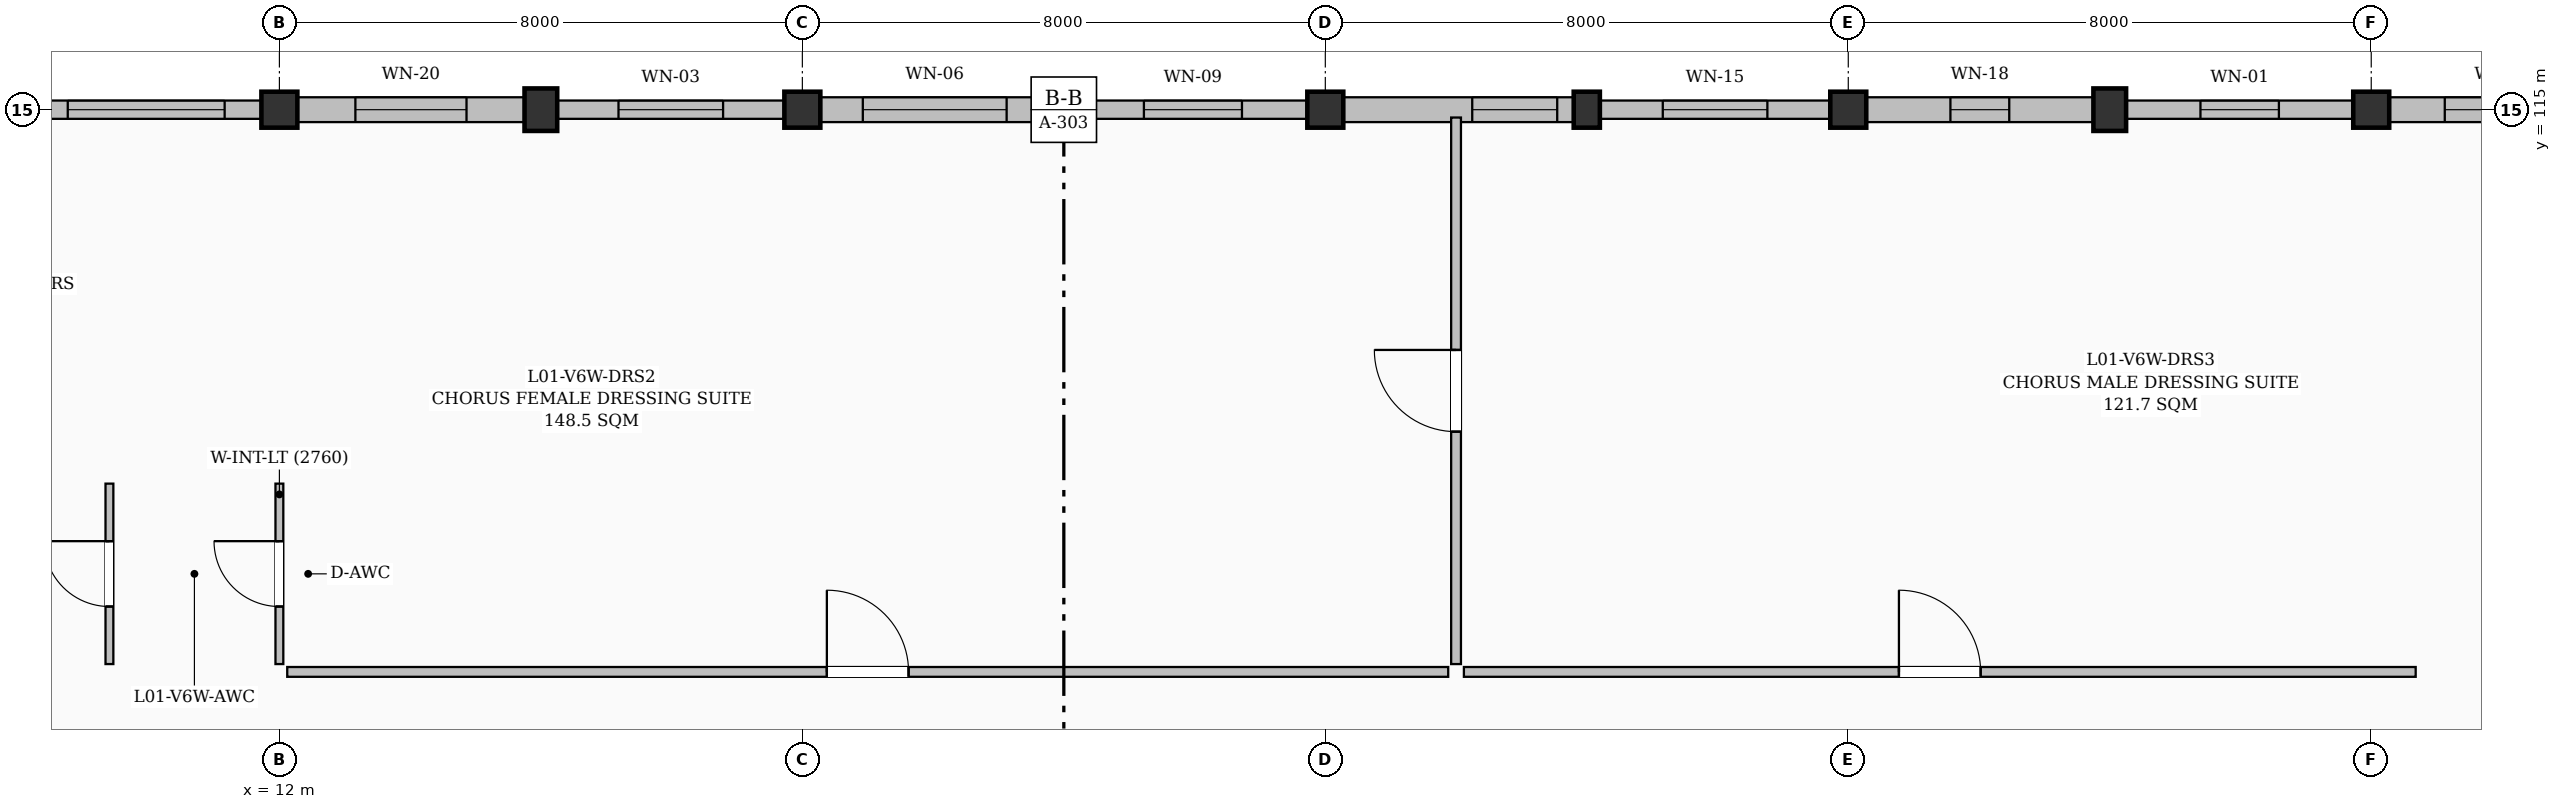
"""IFC4 building model, lengths in metres.
Left out: names, types, materials, properties, quantities, classifications, styles, units other than length and angle.
Written with IfcOpenShell. Run it as: python <this file> out.ifc"""

import sys

from ifc_helpers import new_model, si_unit, direction, frame, frame_2d, origin, origin_2d, place, context, subcontext, project, spatial, rectangle, extrude, element, fill, save


model = new_model("IFC4")
c1 = context("Model", 3, precision=1e-05, world=origin(), true_north=direction((0.0, 1.0)))
c2 = subcontext(c1, "Body", "Model", "MODEL_VIEW")
j1 = project(units=[si_unit("LENGTHUNIT", "METRE"), si_unit("PLANEANGLEUNIT", "RADIAN")], contexts=[c1])
p1 = place(None, origin())
s1 = spatial("IfcSite", under=j1, at=p1, CompositionType="ELEMENT")
p2 = place(p1, origin())
s2 = spatial("IfcBuilding", under=s1, at=p2, CompositionType="ELEMENT")
p3 = place(p2, frame((0.0, 0.0, 4.8)))
s3 = spatial("IfcBuildingStorey", under=s2, at=p3, CompositionType="ELEMENT", Elevation=4.8)
p4 = place(p3, frame((12.0, 115.0, 0.0), z_axis=(0.0, 0.0, 1.0), x_axis=(1.0, 0.0, 0.0)))
e1 = element("IfcColumn", 1, at=p4, inside=s3, PredefinedType="COLUMN", context=c2, shape_type="SweptSolid", body=[
    extrude(rectangle(XDim=0.55, YDim=0.55, at=origin_2d()), origin(), (0.0, 0.0, 1.0), 4.5),
])
p5 = place(p3, frame((16.0, 115.0, 0.0), z_axis=(0.0, 0.0, 1.0), x_axis=(1.0, 0.0, 0.0)))
e2 = element("IfcColumn", 2, at=p5, inside=s3, PredefinedType="PILASTER", context=c2, shape_type="SweptSolid", body=[
    extrude(rectangle(XDim=0.5, YDim=0.65, at=origin_2d()), origin(), (0.0, 0.0, 1.0), 4.5),
])
p6 = place(p3, frame((20.0, 115.0, 0.0), z_axis=(0.0, 0.0, 1.0), x_axis=(1.0, 0.0, 0.0)))
e3 = element("IfcColumn", 3, at=p6, inside=s3, PredefinedType="COLUMN", context=c2, shape_type="SweptSolid", body=[
    extrude(rectangle(XDim=0.55, YDim=0.55, at=origin_2d()), origin(), (0.0, 0.0, 1.0), 4.5),
])
p7 = place(p3, frame((24.0, 115.0, 0.0), z_axis=(0.0, 0.0, 1.0), x_axis=(1.0, 0.0, 0.0)))
e4 = element("IfcColumn", 4, at=p7, inside=s3, PredefinedType="PILASTER", context=c2, shape_type="SweptSolid", body=[
    extrude(rectangle(XDim=0.45, YDim=0.6, at=origin_2d()), origin(), (0.0, 0.0, 1.0), 4.5),
])
p8 = place(p3, frame((28.0, 115.0, 0.0), z_axis=(0.0, 0.0, 1.0), x_axis=(1.0, 0.0, 0.0)))
e5 = element("IfcColumn", 5, at=p8, inside=s3, PredefinedType="COLUMN", context=c2, shape_type="SweptSolid", body=[
    extrude(rectangle(XDim=0.55, YDim=0.55, at=origin_2d()), origin(), (0.0, 0.0, 1.0), 4.5),
])
p9 = place(p3, frame((32.0, 115.0, 0.0), z_axis=(0.0, 0.0, 1.0), x_axis=(1.0, 0.0, 0.0)))
e6 = element("IfcColumn", 6, at=p9, inside=s3, PredefinedType="PILASTER", context=c2, shape_type="SweptSolid", body=[
    extrude(rectangle(XDim=0.4, YDim=0.55, at=origin_2d()), origin(), (0.0, 0.0, 1.0), 4.5),
])
p10 = place(p3, frame((36.0, 115.0, 0.0), z_axis=(0.0, 0.0, 1.0), x_axis=(1.0, 0.0, 0.0)))
e7 = element("IfcColumn", 7, at=p10, inside=s3, PredefinedType="COLUMN", context=c2, shape_type="SweptSolid", body=[
    extrude(rectangle(XDim=0.55, YDim=0.55, at=origin_2d()), origin(), (0.0, 0.0, 1.0), 4.5),
])
p11 = place(p3, frame((40.0, 115.0, 0.0), z_axis=(0.0, 0.0, 1.0), x_axis=(1.0, 0.0, 0.0)))
e8 = element("IfcColumn", 8, at=p11, inside=s3, PredefinedType="PILASTER", context=c2, shape_type="SweptSolid", body=[
    extrude(rectangle(XDim=0.5, YDim=0.65, at=origin_2d()), origin(), (0.0, 0.0, 1.0), 4.5),
])
p12 = place(p3, frame((44.0, 115.0, 0.0), z_axis=(0.0, 0.0, 1.0), x_axis=(1.0, 0.0, 0.0)))
e9 = element("IfcColumn", 9, at=p12, inside=s3, PredefinedType="COLUMN", context=c2, shape_type="SweptSolid", body=[
    extrude(rectangle(XDim=0.55, YDim=0.55, at=origin_2d()), origin(), (0.0, 0.0, 1.0), 4.5),
])
p13 = place(p3, frame((8.2, 115.0, 0.0), z_axis=(0.0, 0.0, 1.0), x_axis=(1.0, 0.0, 0.0)))
e10 = element("IfcWall", 10, at=p13, inside=s3, PredefinedType="SOLIDWALL", context=c2, shape_type="SweptSolid", body=[
    extrude(rectangle(XDim=3.525, YDim=0.28, at=frame_2d((1.763, 0.0))), origin(), (0.0, 0.0, 1.0), 4.125),
])
p14 = place(p13, frame((0.562, 0.0, 0.95)))
e11 = element("IfcOpeningElement", 11, at=p14, cuts=e10, PredefinedType="OPENING", context=c2, shape_type="SweptSolid", body=[
    extrude(rectangle(XDim=2.4, YDim=1.2, at=frame_2d((1.2, 0.6))), frame((0.0, 0.15, 0.0), z_axis=(0.0, -1.0, 0.0), x_axis=(1.0, 0.0, 0.0)), (0.0, 0.0, 1.0), 0.3),
])
p15 = place(p3, frame((12.275, 115.0, 0.0), z_axis=(0.0, 0.0, 1.0), x_axis=(1.0, 0.0, 0.0)))
e12 = element("IfcWall", 12, at=p15, inside=s3, PredefinedType="SOLIDWALL", context=c2, shape_type="SweptSolid", body=[
    extrude(rectangle(XDim=3.475, YDim=0.38, at=frame_2d((1.738, 0.0))), origin(), (0.0, 0.0, 1.0), 4.125),
])
p16 = place(p15, frame((0.887, 0.0, 0.95)))
e13 = element("IfcOpeningElement", 13, at=p16, cuts=e12, PredefinedType="OPENING", context=c2, shape_type="SweptSolid", body=[
    extrude(rectangle(XDim=1.7, YDim=2.0, at=frame_2d((0.85, 1.0))), frame((0.0, 0.2, 0.0), z_axis=(0.0, -1.0, 0.0), x_axis=(1.0, 0.0, 0.0)), (0.0, 0.0, 1.0), 0.4),
])
p17 = place(p3, frame((16.25, 115.0, 0.0), z_axis=(0.0, 0.0, 1.0), x_axis=(1.0, 0.0, 0.0)))
e14 = element("IfcWall", 14, at=p17, inside=s3, PredefinedType="SOLIDWALL", context=c2, shape_type="SweptSolid", body=[
    extrude(rectangle(XDim=3.475, YDim=0.28, at=frame_2d((1.738, 0.0))), origin(), (0.0, 0.0, 1.0), 4.125),
])
p18 = place(p17, frame((0.938, 0.0, 0.95)))
e15 = element("IfcOpeningElement", 15, at=p18, cuts=e14, PredefinedType="OPENING", context=c2, shape_type="SweptSolid", body=[
    extrude(rectangle(XDim=1.6, YDim=1.8, at=frame_2d((0.8, 0.9))), frame((0.0, 0.15, 0.0), z_axis=(0.0, -1.0, 0.0), x_axis=(1.0, 0.0, 0.0)), (0.0, 0.0, 1.0), 0.3),
])
p19 = place(p3, frame((20.275, 115.0, 0.0), z_axis=(0.0, 0.0, 1.0), x_axis=(1.0, 0.0, 0.0)))
e16 = element("IfcWall", 16, at=p19, inside=s3, PredefinedType="SOLIDWALL", context=c2, shape_type="SweptSolid", body=[
    extrude(rectangle(XDim=3.5, YDim=0.38, at=frame_2d((1.75, 0.0))), origin(), (0.0, 0.0, 1.0), 4.125),
])
p20 = place(p19, frame((0.65, 0.0, 0.95)))
e17 = element("IfcOpeningElement", 17, at=p20, cuts=e16, PredefinedType="OPENING", context=c2, shape_type="SweptSolid", body=[
    extrude(rectangle(XDim=2.2, YDim=1.8, at=frame_2d((1.1, 0.9))), frame((0.0, 0.2, 0.0), z_axis=(0.0, -1.0, 0.0), x_axis=(1.0, 0.0, 0.0)), (0.0, 0.0, 1.0), 0.4),
])
p21 = place(p3, frame((24.225, 115.0, 0.0), z_axis=(0.0, 0.0, 1.0), x_axis=(1.0, 0.0, 0.0)))
e18 = element("IfcWall", 18, at=p21, inside=s3, PredefinedType="SOLIDWALL", context=c2, shape_type="SweptSolid", body=[
    extrude(rectangle(XDim=3.5, YDim=0.28, at=frame_2d((1.75, 0.0))), origin(), (0.0, 0.0, 1.0), 4.125),
])
p22 = place(p21, frame((1.0, 0.0, 0.95)))
e19 = element("IfcOpeningElement", 19, at=p22, cuts=e18, PredefinedType="OPENING", context=c2, shape_type="SweptSolid", body=[
    extrude(rectangle(XDim=1.5, YDim=1.5, at=frame_2d((0.75, 0.75))), frame((0.0, 0.15, 0.0), z_axis=(0.0, -1.0, 0.0), x_axis=(1.0, 0.0, 0.0)), (0.0, 0.0, 1.0), 0.3),
])
p23 = place(p3, frame((28.275, 115.0, 0.0), z_axis=(0.0, 0.0, 1.0), x_axis=(1.0, 0.0, 0.0)))
e20 = element("IfcWall", 20, at=p23, inside=s3, PredefinedType="SOLIDWALL", context=c2, shape_type="SweptSolid", body=[
    extrude(rectangle(XDim=3.525, YDim=0.38, at=frame_2d((1.763, 0.0))), origin(), (0.0, 0.0, 1.0), 4.125),
])
p24 = place(p23, frame((1.972, 0.0, 0.95)))
e21 = element("IfcOpeningElement", 21, at=p24, cuts=e20, PredefinedType="OPENING", context=c2, shape_type="SweptSolid", body=[
    extrude(rectangle(XDim=1.3, YDim=1.4, at=frame_2d((0.65, 0.7))), frame((0.0, 0.2, 0.0), z_axis=(0.0, -1.0, 0.0), x_axis=(1.0, 0.0, 0.0)), (0.0, 0.0, 1.0), 0.4),
])
p25 = place(p3, frame((32.2, 115.0, 0.0), z_axis=(0.0, 0.0, 1.0), x_axis=(1.0, 0.0, 0.0)))
e22 = element("IfcWall", 22, at=p25, inside=s3, PredefinedType="SOLIDWALL", context=c2, shape_type="SweptSolid", body=[
    extrude(rectangle(XDim=3.525, YDim=0.28, at=frame_2d((1.763, 0.0))), origin(), (0.0, 0.0, 1.0), 4.125),
])
p26 = place(p25, frame((0.962, 0.0, 0.95)))
e23 = element("IfcOpeningElement", 23, at=p26, cuts=e22, PredefinedType="OPENING", context=c2, shape_type="SweptSolid", body=[
    extrude(rectangle(XDim=1.6, YDim=1.2, at=frame_2d((0.8, 0.6))), frame((0.0, 0.15, 0.0), z_axis=(0.0, -1.0, 0.0), x_axis=(1.0, 0.0, 0.0)), (0.0, 0.0, 1.0), 0.3),
])
p27 = place(p3, frame((36.275, 115.0, 0.0), z_axis=(0.0, 0.0, 1.0), x_axis=(1.0, 0.0, 0.0)))
e24 = element("IfcWall", 24, at=p27, inside=s3, PredefinedType="SOLIDWALL", context=c2, shape_type="SweptSolid", body=[
    extrude(rectangle(XDim=3.475, YDim=0.38, at=frame_2d((1.738, 0.0))), origin(), (0.0, 0.0, 1.0), 4.125),
])
p28 = place(p27, frame((1.288, 0.0, 0.95)))
e25 = element("IfcOpeningElement", 25, at=p28, cuts=e24, PredefinedType="OPENING", context=c2, shape_type="SweptSolid", body=[
    extrude(rectangle(XDim=0.9, YDim=1.8, at=frame_2d((0.45, 0.9))), frame((0.0, 0.2, 0.0), z_axis=(0.0, -1.0, 0.0), x_axis=(1.0, 0.0, 0.0)), (0.0, 0.0, 1.0), 0.4),
])
p29 = place(p3, frame((40.25, 115.0, 0.0), z_axis=(0.0, 0.0, 1.0), x_axis=(1.0, 0.0, 0.0)))
e26 = element("IfcWall", 26, at=p29, inside=s3, PredefinedType="SOLIDWALL", context=c2, shape_type="SweptSolid", body=[
    extrude(rectangle(XDim=3.475, YDim=0.28, at=frame_2d((1.738, 0.0))), origin(), (0.0, 0.0, 1.0), 4.125),
])
p30 = place(p29, frame((1.137, 0.0, 0.95)))
e27 = element("IfcOpeningElement", 27, at=p30, cuts=e26, PredefinedType="OPENING", context=c2, shape_type="SweptSolid", body=[
    extrude(rectangle(XDim=1.2, YDim=1.8, at=frame_2d((0.6, 0.9))), frame((0.0, 0.15, 0.0), z_axis=(0.0, -1.0, 0.0), x_axis=(1.0, 0.0, 0.0)), (0.0, 0.0, 1.0), 0.3),
])
p31 = place(p3, frame((44.275, 115.0, 0.0), z_axis=(0.0, 0.0, 1.0), x_axis=(1.0, 0.0, 0.0)))
e28 = element("IfcWall", 28, at=p31, inside=s3, PredefinedType="SOLIDWALL", context=c2, shape_type="SweptSolid", body=[
    extrude(rectangle(XDim=3.5, YDim=0.38, at=frame_2d((1.75, 0.0))), origin(), (0.0, 0.0, 1.0), 4.125),
])
p32 = place(p31, frame((0.85, 0.0, 0.95)))
e29 = element("IfcOpeningElement", 29, at=p32, cuts=e28, PredefinedType="OPENING", context=c2, shape_type="SweptSolid", body=[
    extrude(rectangle(XDim=1.8, YDim=1.8, at=frame_2d((0.9, 0.9))), frame((0.0, 0.2, 0.0), z_axis=(0.0, -1.0, 0.0), x_axis=(1.0, 0.0, 0.0)), (0.0, 0.0, 1.0), 0.4),
])
p33 = place(p3, frame((30.0, 106.52, 0.0), z_axis=(0.0, 0.0, 1.0), x_axis=(0.0, 1.0, 0.0)))
e30 = element("IfcWall", 30, at=p33, inside=s3, PredefinedType="PARTITIONING", context=c2, shape_type="SweptSolid", body=[
    extrude(rectangle(XDim=8.36, YDim=0.15, at=frame_2d((4.18, 0.0))), origin(), (0.0, 0.0, 1.0), 4.25),
])
p34 = place(p33, frame((3.555, 0.0, 0.0)))
e31 = element("IfcOpeningElement", 31, at=p34, cuts=e30, PredefinedType="OPENING", context=c2, shape_type="SweptSolid", body=[
    extrude(rectangle(XDim=1.25, YDim=2.15, at=frame_2d((0.625, 1.075))), frame((0.0, 0.085, 0.0), z_axis=(0.0, -1.0, 0.0), x_axis=(1.0, 0.0, 0.0)), (0.0, 0.0, 1.0), 0.17),
])
p35 = place(p3, frame((12.12, 106.4, 0.0), z_axis=(0.0, 0.0, 1.0), x_axis=(1.0, 0.0, 0.0)))
e32 = element("IfcWall", 32, at=p35, inside=s3, PredefinedType="PARTITIONING", context=c2, shape_type="SweptSolid", body=[
    extrude(rectangle(XDim=17.76, YDim=0.15, at=frame_2d((8.88, 0.0))), origin(), (0.0, 0.0, 1.0), 4.25),
])
p36 = place(p35, frame((8.255, 0.0, 0.0)))
e33 = element("IfcOpeningElement", 33, at=p36, cuts=e32, PredefinedType="OPENING", context=c2, shape_type="SweptSolid", body=[
    extrude(rectangle(XDim=1.25, YDim=2.15, at=frame_2d((0.625, 1.075))), frame((0.0, 0.085, 0.0), z_axis=(0.0, -1.0, 0.0), x_axis=(1.0, 0.0, 0.0)), (0.0, 0.0, 1.0), 0.17),
])
p37 = place(p3, frame((12.0, 106.52, 0.0), z_axis=(0.0, 0.0, 1.0), x_axis=(0.0, 1.0, 0.0)))
e34 = element("IfcWall", 34, at=p37, inside=s3, PredefinedType="PARTITIONING", context=c2, shape_type="SweptSolid", body=[
    extrude(rectangle(XDim=2.76, YDim=0.12, at=frame_2d((1.38, 0.0))), origin(), (0.0, 0.0, 1.0), 4.25),
])
p38 = place(p37, frame((0.88, 0.0, 0.0)))
e35 = element("IfcOpeningElement", 35, at=p38, cuts=e34, PredefinedType="OPENING", context=c2, shape_type="SweptSolid", body=[
    extrude(rectangle(XDim=1.0, YDim=2.1, at=frame_2d((0.5, 1.05))), frame((0.0, 0.07, 0.0), z_axis=(0.0, -1.0, 0.0), x_axis=(1.0, 0.0, 0.0)), (0.0, 0.0, 1.0), 0.14),
])
p39 = place(p3, frame((30.12, 106.4, 0.0), z_axis=(0.0, 0.0, 1.0), x_axis=(1.0, 0.0, 0.0)))
e36 = element("IfcWall", 36, at=p39, inside=s3, PredefinedType="PARTITIONING", context=c2, shape_type="SweptSolid", body=[
    extrude(rectangle(XDim=14.56, YDim=0.15, at=frame_2d((7.28, 0.0))), origin(), (0.0, 0.0, 1.0), 4.25),
])
p40 = place(p39, frame((6.655, 0.0, 0.0)))
e37 = element("IfcOpeningElement", 37, at=p40, cuts=e36, PredefinedType="OPENING", context=c2, shape_type="SweptSolid", body=[
    extrude(rectangle(XDim=1.25, YDim=2.15, at=frame_2d((0.625, 1.075))), frame((0.0, 0.085, 0.0), z_axis=(0.0, -1.0, 0.0), x_axis=(1.0, 0.0, 0.0)), (0.0, 0.0, 1.0), 0.17),
])
p41 = place(p3, frame((9.4, 106.52, 0.0), z_axis=(0.0, 0.0, 1.0), x_axis=(0.0, 1.0, 0.0)))
e38 = element("IfcWall", 38, at=p41, inside=s3, PredefinedType="PARTITIONING", context=c2, shape_type="SweptSolid", body=[
    extrude(rectangle(XDim=2.76, YDim=0.12, at=frame_2d((1.38, 0.0))), origin(), (0.0, 0.0, 1.0), 4.25),
])
p42 = place(p41, frame((0.88, 0.0, 0.0)))
e39 = element("IfcOpeningElement", 39, at=p42, cuts=e38, PredefinedType="OPENING", context=c2, shape_type="SweptSolid", body=[
    extrude(rectangle(XDim=1.0, YDim=2.1, at=frame_2d((0.5, 1.05))), frame((0.0, 0.07, 0.0), z_axis=(0.0, -1.0, 0.0), x_axis=(1.0, 0.0, 0.0)), (0.0, 0.0, 1.0), 0.14),
])
p43 = place(p14, origin())
e40 = element("IfcWindow", 40, at=p43, inside=s3, PartitioningType="TRIPLE_PANEL_HORIZONTAL", PredefinedType="WINDOW", context=c2, shape_type="SweptSolid", body=[
    extrude(rectangle(XDim=2.4, YDim=1.2, at=frame_2d((1.2, 0.6))), frame((0.0, 0.03, 0.0), z_axis=(0.0, -1.0, 0.0), x_axis=(1.0, 0.0, 0.0)), (0.0, 0.0, 1.0), 0.06),
])
fill(e11, e40)
p44 = place(p16, origin())
e41 = element("IfcWindow", 41, at=p44, inside=s3, PartitioningType="DOUBLE_PANEL_VERTICAL", PredefinedType="WINDOW", context=c2, shape_type="SweptSolid", body=[
    extrude(rectangle(XDim=1.7, YDim=2.0, at=frame_2d((0.85, 1.0))), frame((0.0, 0.03, 0.0), z_axis=(0.0, -1.0, 0.0), x_axis=(1.0, 0.0, 0.0)), (0.0, 0.0, 1.0), 0.06),
])
fill(e13, e41)
p45 = place(p18, origin())
e42 = element("IfcWindow", 42, at=p45, inside=s3, PartitioningType="DOUBLE_PANEL_VERTICAL", PredefinedType="WINDOW", context=c2, shape_type="SweptSolid", body=[
    extrude(rectangle(XDim=1.6, YDim=1.8, at=frame_2d((0.8, 0.9))), frame((0.0, 0.03, 0.0), z_axis=(0.0, -1.0, 0.0), x_axis=(1.0, 0.0, 0.0)), (0.0, 0.0, 1.0), 0.06),
])
fill(e15, e42)
p46 = place(p20, origin())
e43 = element("IfcWindow", 43, at=p46, inside=s3, PartitioningType="TRIPLE_PANEL_VERTICAL", PredefinedType="WINDOW", context=c2, shape_type="SweptSolid", body=[
    extrude(rectangle(XDim=2.2, YDim=1.8, at=frame_2d((1.1, 0.9))), frame((0.0, 0.03, 0.0), z_axis=(0.0, -1.0, 0.0), x_axis=(1.0, 0.0, 0.0)), (0.0, 0.0, 1.0), 0.06),
])
fill(e17, e43)
p47 = place(p22, origin())
e44 = element("IfcWindow", 44, at=p47, inside=s3, PartitioningType="DOUBLE_PANEL_VERTICAL", PredefinedType="WINDOW", context=c2, shape_type="SweptSolid", body=[
    extrude(rectangle(XDim=1.5, YDim=1.5, at=frame_2d((0.75, 0.75))), frame((0.0, 0.03, 0.0), z_axis=(0.0, -1.0, 0.0), x_axis=(1.0, 0.0, 0.0)), (0.0, 0.0, 1.0), 0.06),
])
fill(e19, e44)
p48 = place(p24, origin())
e45 = element("IfcWindow", 45, at=p48, inside=s3, PartitioningType="TRIPLE_PANEL_VERTICAL", PredefinedType="WINDOW", context=c2, shape_type="SweptSolid", body=[
    extrude(rectangle(XDim=1.3, YDim=1.4, at=frame_2d((0.65, 0.7))), frame((0.0, 0.03, 0.0), z_axis=(0.0, -1.0, 0.0), x_axis=(1.0, 0.0, 0.0)), (0.0, 0.0, 1.0), 0.06),
])
fill(e21, e45)
p49 = place(p26, origin())
e46 = element("IfcWindow", 46, at=p49, inside=s3, PartitioningType="DOUBLE_PANEL_HORIZONTAL", PredefinedType="WINDOW", context=c2, shape_type="SweptSolid", body=[
    extrude(rectangle(XDim=1.6, YDim=1.2, at=frame_2d((0.8, 0.6))), frame((0.0, 0.03, 0.0), z_axis=(0.0, -1.0, 0.0), x_axis=(1.0, 0.0, 0.0)), (0.0, 0.0, 1.0), 0.06),
])
fill(e23, e46)
p50 = place(p28, origin())
e47 = element("IfcWindow", 47, at=p50, inside=s3, PartitioningType="SINGLE_PANEL", PredefinedType="WINDOW", context=c2, shape_type="SweptSolid", body=[
    extrude(rectangle(XDim=0.9, YDim=1.8, at=frame_2d((0.45, 0.9))), frame((0.0, 0.03, 0.0), z_axis=(0.0, -1.0, 0.0), x_axis=(1.0, 0.0, 0.0)), (0.0, 0.0, 1.0), 0.06),
])
fill(e25, e47)
p51 = place(p30, origin())
e48 = element("IfcWindow", 48, at=p51, inside=s3, PartitioningType="SINGLE_PANEL", PredefinedType="WINDOW", context=c2, shape_type="SweptSolid", body=[
    extrude(rectangle(XDim=1.2, YDim=1.8, at=frame_2d((0.6, 0.9))), frame((0.0, 0.03, 0.0), z_axis=(0.0, -1.0, 0.0), x_axis=(1.0, 0.0, 0.0)), (0.0, 0.0, 1.0), 0.06),
])
fill(e27, e48)
p52 = place(p32, origin())
e49 = element("IfcWindow", 49, at=p52, inside=s3, PartitioningType="DOUBLE_PANEL_VERTICAL", PredefinedType="WINDOW", context=c2, shape_type="SweptSolid", body=[
    extrude(rectangle(XDim=1.8, YDim=1.8, at=frame_2d((0.9, 0.9))), frame((0.0, 0.03, 0.0), z_axis=(0.0, -1.0, 0.0), x_axis=(1.0, 0.0, 0.0)), (0.0, 0.0, 1.0), 0.06),
])
fill(e29, e49)
p53 = place(p34, origin())
e50 = element("IfcDoor", 50, at=p53, inside=s3, OperationType="SINGLE_SWING_RIGHT", PredefinedType="DOOR", context=c2, shape_type="SweptSolid", body=[
    extrude(rectangle(XDim=1.25, YDim=2.15, at=frame_2d((0.625, 1.075))), frame((0.0, 0.025, 0.0), z_axis=(0.0, -1.0, 0.0), x_axis=(1.0, 0.0, 0.0)), (0.0, 0.0, 1.0), 0.05),
])
fill(e31, e50)
p54 = place(p36, origin())
e51 = element("IfcDoor", 51, at=p54, inside=s3, OperationType="SINGLE_SWING_LEFT", PredefinedType="DOOR", context=c2, shape_type="SweptSolid", body=[
    extrude(rectangle(XDim=1.25, YDim=2.15, at=frame_2d((0.625, 1.075))), frame((0.0, 0.025, 0.0), z_axis=(0.0, -1.0, 0.0), x_axis=(1.0, 0.0, 0.0)), (0.0, 0.0, 1.0), 0.05),
])
fill(e33, e51)
p55 = place(p38, origin())
e52 = element("IfcDoor", 52, at=p55, inside=s3, OperationType="SINGLE_SWING_RIGHT", PredefinedType="DOOR", context=c2, shape_type="SweptSolid", body=[
    extrude(rectangle(XDim=1.0, YDim=2.1, at=frame_2d((0.5, 1.05))), frame((0.0, 0.025, 0.0), z_axis=(0.0, -1.0, 0.0), x_axis=(1.0, 0.0, 0.0)), (0.0, 0.0, 1.0), 0.05),
])
fill(e35, e52)
p56 = place(p40, origin())
e53 = element("IfcDoor", 53, at=p56, inside=s3, OperationType="SINGLE_SWING_LEFT", PredefinedType="DOOR", context=c2, shape_type="SweptSolid", body=[
    extrude(rectangle(XDim=1.25, YDim=2.15, at=frame_2d((0.625, 1.075))), frame((0.0, 0.025, 0.0), z_axis=(0.0, -1.0, 0.0), x_axis=(1.0, 0.0, 0.0)), (0.0, 0.0, 1.0), 0.05),
])
fill(e37, e53)
p57 = place(p42, origin())
e54 = element("IfcDoor", 54, at=p57, inside=s3, OperationType="SINGLE_SWING_RIGHT", PredefinedType="DOOR", context=c2, shape_type="SweptSolid", body=[
    extrude(rectangle(XDim=1.0, YDim=2.1, at=frame_2d((0.5, 1.05))), frame((0.0, 0.025, 0.0), z_axis=(0.0, -1.0, 0.0), x_axis=(1.0, 0.0, 0.0)), (0.0, 0.0, 1.0), 0.05),
])
fill(e39, e54)
save(model, sys.argv[1])
